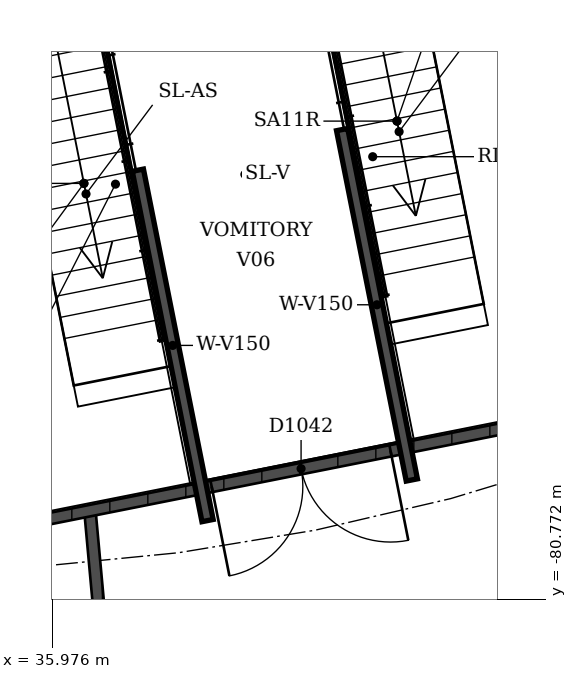
"""IFC4 building model, lengths in metres.
Left out: names, types, materials, properties, quantities, classifications, styles, units other than length and angle.
Written with IfcOpenShell. Run it as: python <this file> out.ifc"""

import sys

from ifc_helpers import new_model, si_unit, direction, frame, frame_2d, origin, place, context, subcontext, project, spatial, rectangle, extrude, element, fill, save


model = new_model("IFC4")
c1 = context("Model", 3, precision=1e-05, world=origin(), true_north=direction((0.0, 1.0)))
c2 = subcontext(c1, "Body", "Model", "MODEL_VIEW")
j1 = project(units=[si_unit("LENGTHUNIT", "METRE"), si_unit("PLANEANGLEUNIT", "RADIAN")], contexts=[c1])
p1 = place(None, origin())
s1 = spatial("IfcSite", under=j1, at=p1, CompositionType="ELEMENT")
p2 = place(p1, origin())
s2 = spatial("IfcBuilding", under=s1, at=p2, CompositionType="ELEMENT")
p3 = place(p2, origin())
s3 = spatial("IfcBuildingStorey", under=s2, at=p3, CompositionType="ELEMENT", Elevation=0.0)
p4 = place(p3, frame((36.473, -79.608, 0.0), z_axis=(0.0, 0.0, 1.0), x_axis=(0.090871085934, -0.995862664096, 0.0)))
e1 = element("IfcWall", 1, at=p4, inside=s3, PredefinedType="SOLIDWALL", context=c2, shape_type="SweptSolid", body=[
    extrude(rectangle(XDim=4.857, YDim=0.15, at=frame_2d((2.429, 0.0))), origin(), (0.0, 0.0, 1.0), 3.0),
])
p5 = place(p3, frame((44.112, -78.089, 0.0), z_axis=(0.0, 0.0, 1.0), x_axis=(-0.980787086023, -0.195081244333, 0.0)))
e2 = element("IfcWall", 2, at=p5, inside=s3, PredefinedType="SOLIDWALL", context=c2, shape_type="SweptSolid", body=[
    extrude(rectangle(XDim=9.8, YDim=0.15, at=frame_2d((4.9, 0.0))), origin(), (0.0, 0.0, 1.0), 3.0),
])
p6 = place(p5, frame((3.756, 0.0, 0.0)))
e3 = element("IfcOpeningElement", 3, at=p6, cuts=e2, PredefinedType="OPENING", context=c2, shape_type="SweptSolid", body=[
    extrude(rectangle(XDim=2.4, YDim=2.4, at=frame_2d((1.2, 1.2))), frame((0.0, 0.075, 0.0), z_axis=(0.0, -1.0, 0.0), x_axis=(1.0, 0.0, 0.0)), (0.0, 0.0, 1.0), 0.15),
])
for number, where, z_axis, x_axis in (
    (4, (37.104, -75.129, 0.0), (0.0, 0.0, 1.0), (0.195, -0.981, 0.0)),
    (5, (39.792, -74.595, 0.0), (0.0, 0.0, 1.0), (0.195, -0.981, 0.0)),
):
    element("IfcWall", number, at=place(p3, frame(where, z_axis=z_axis, x_axis=x_axis)), inside=s3, PredefinedType="SOLIDWALL", context=c2, shape_type="SweptSolid", body=[
        extrude(rectangle(XDim=4.7, YDim=0.15, at=frame_2d((2.35, 0.0))), origin(), (0.0, 0.0, 1.0), 2.75),
    ])
p7 = place(p6, origin())
e6 = element("IfcDoor", 6, at=p7, inside=s3, OperationType="DOUBLE_DOOR_SINGLE_SWING", PredefinedType="DOOR", context=c2, shape_type="SweptSolid", body=[
    extrude(rectangle(XDim=2.4, YDim=2.4, at=frame_2d((1.2, 1.2))), frame((0.0, 0.025, 0.0), z_axis=(0.0, -1.0, 0.0), x_axis=(1.0, 0.0, 0.0)), (0.0, 0.0, 1.0), 0.05),
])
fill(e3, e6)
save(model, sys.argv[1])
